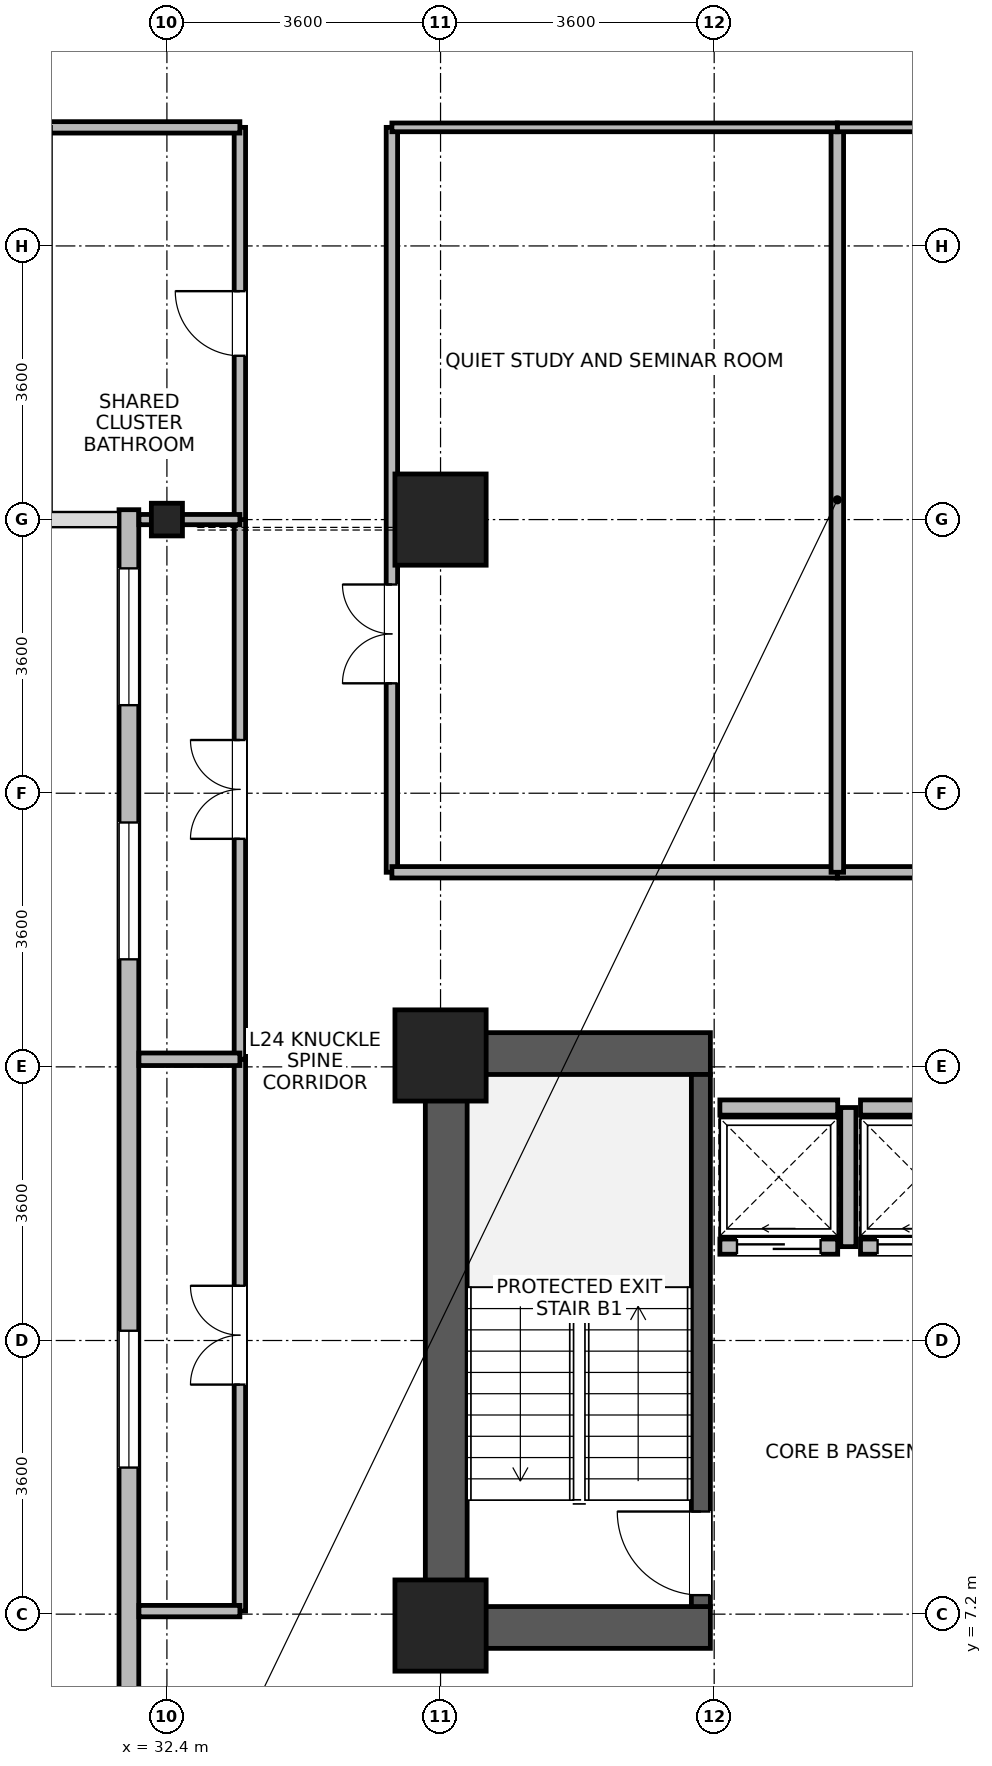
"""IFC4 building model, lengths in metres.
Left out: names, types, materials, properties, quantities, classifications, styles, units other than length and angle.
Written with IfcOpenShell. Run it as: python <this file> out.ifc"""

import sys

from ifc_helpers import new_model, si_unit, direction, frame, frame_2d, origin, origin_2d, place, context, subcontext, project, spatial, rectangle, i_section, extrude, source, transform, mapped, element, fill, save


model = new_model("IFC4")
c1 = context("Model", 3, precision=1e-05, world=origin(), true_north=direction((0.0, 1.0)))
c2 = subcontext(c1, "Body", "Model", "MODEL_VIEW")
j1 = project(units=[si_unit("LENGTHUNIT", "METRE"), si_unit("PLANEANGLEUNIT", "RADIAN")], contexts=[c1])
p1 = place(None, origin())
s1 = spatial("IfcSite", under=j1, at=p1, CompositionType="ELEMENT")
p2 = place(p1, origin())
s2 = spatial("IfcBuilding", under=s1, at=p2, CompositionType="ELEMENT")
p3 = place(p2, frame((0.0, 0.0, 97.1)))
s3 = spatial("IfcBuildingStorey", under=s2, at=p3, CompositionType="ELEMENT", Elevation=97.1)
p4 = place(p3, frame((36.075, 6.75, 0.0), z_axis=(0.0, 0.0, 1.0), x_axis=(0.0, 1.0, 0.0)))
e1 = element("IfcWall", 1, at=p4, inside=s3, PredefinedType="SHEAR", context=c2, shape_type="SweptSolid", body=[
    extrude(rectangle(XDim=8.1, YDim=0.55, at=frame_2d((4.05, 0.0))), origin(), (0.0, 0.0, 1.0), 3.45),
])
for number, where, z_axis, x_axis in (
    (2, (36.35, 7.025, 0.0), (0.0, 0.0, 1.0), (1.0, 0.0, 0.0)),
    (3, (36.35, 14.575, 0.0), (0.0, 0.0, 1.0), (1.0, 0.0, 0.0)),
):
    element("IfcWall", number, at=place(p3, frame(where, z_axis=z_axis, x_axis=x_axis)), inside=s3, PredefinedType="SHEAR", context=c2, shape_type="SweptSolid", body=[
        extrude(rectangle(XDim=3.2, YDim=0.55, at=frame_2d((1.6, 0.0))), origin(), (0.0, 0.0, 1.0), 3.45),
    ])
p5 = place(p3, frame((39.425, 7.3, 0.0), z_axis=(0.0, 0.0, 1.0), x_axis=(0.0, 1.0, 0.0)))
e4 = element("IfcWall", 4, at=p5, inside=s3, PredefinedType="SHEAR", context=c2, shape_type="SweptSolid", body=[
    extrude(rectangle(XDim=7.0, YDim=0.25, at=frame_2d((3.5, 0.0))), origin(), (0.0, 0.0, 1.0), 3.45),
])
p6 = place(p5, frame((0.15, 0.0, 0.0)))
e5 = element("IfcOpeningElement", 5, at=p6, cuts=e4, PredefinedType="OPENING", context=c2, shape_type="SweptSolid", body=[
    extrude(rectangle(XDim=1.1, YDim=2.08, at=frame_2d((0.55, 1.04))), frame((0.0, 0.135, 0.0), z_axis=(0.0, -1.0, 0.0), x_axis=(1.0, 0.0, 0.0)), (0.0, 0.0, 1.0), 0.27),
])
m1 = source(origin(), c2, "Body", "SweptSolid", [
    extrude(rectangle(XDim=1.2, YDim=1.2, at=origin_2d()), origin(), (0.0, 0.0, 1.0), 3.7),
])
for number, where, z_axis, x_axis in (
    (6, (36.0, 21.6, 0.0), (0.0, 0.0, 1.0), (1.0, 0.0, 0.0)),
    (7, (36.0, 7.05, 0.0), (0.0, 0.0, 1.0), (1.0, 0.0, 0.0)),
    (8, (36.0, 14.55, 0.0), (0.0, 0.0, 1.0), (1.0, 0.0, 0.0)),
):
    element("IfcColumn", number, at=place(p3, frame(where, z_axis=z_axis, x_axis=x_axis)), inside=s3, PredefinedType="COLUMN", context=c2, shape_type="MappedRepresentation", body=[
        mapped(m1, transform((0.0, 0.0, 0.0), x_axis=(1.0, 0.0, 0.0), y_axis=(0.0, 1.0, 0.0), z_axis=(0.0, 0.0, 1.0), scale=1.0)),
    ])
m2 = source(origin(), c2, "Body", "SweptSolid", [
    extrude(i_section(OverallWidth=0.409, OverallDepth=0.43, WebThickness=0.024, FlangeThickness=0.033, FilletRadius=0.015, at=origin_2d()), origin(), (0.0, 0.0, 1.0), 3.7),
])
p7 = place(p3, frame((32.4, 21.6, 0.0), z_axis=(0.0, 0.0, 1.0), x_axis=(1.0, 0.0, 0.0)))
e9 = element("IfcColumn", 9, at=p7, inside=s3, PredefinedType="COLUMN", context=c2, shape_type="MappedRepresentation", body=[
    mapped(m2, transform((0.0, 0.0, 0.0), x_axis=(1.0, 0.0, 0.0), y_axis=(0.0, 1.0, 0.0), z_axis=(0.0, 0.0, 1.0), scale=1.0)),
])
p8 = place(p3, frame((31.9, 1.67, 0.0), z_axis=(0.0, 0.0, 1.0), x_axis=(0.0, 1.0, 0.0)))
e10 = element("IfcWall", 10, at=p8, inside=s3, PredefinedType="STANDARD", context=c2, shape_type="SweptSolid", body=[
    extrude(rectangle(XDim=20.06, YDim=0.26, at=frame_2d((10.03, 0.0))), origin(), (0.0, 0.0, 1.0), 3.43),
])
p9 = place(p8, frame((0.772, 0.0, 0.85)))
e11 = element("IfcOpeningElement", 11, at=p9, cuts=e10, PredefinedType="OPENING", context=c2, shape_type="SweptSolid", body=[
    extrude(rectangle(XDim=1.8, YDim=1.85, at=frame_2d((0.9, 0.925))), frame((0.0, 0.14, 0.0), z_axis=(0.0, -1.0, 0.0), x_axis=(1.0, 0.0, 0.0)), (0.0, 0.0, 1.0), 0.28),
])
p10 = place(p8, frame((7.458, 0.0, 0.85)))
e12 = element("IfcOpeningElement", 12, at=p10, cuts=e10, PredefinedType="OPENING", context=c2, shape_type="SweptSolid", body=[
    extrude(rectangle(XDim=1.8, YDim=1.85, at=frame_2d((0.9, 0.925))), frame((0.0, 0.14, 0.0), z_axis=(0.0, -1.0, 0.0), x_axis=(1.0, 0.0, 0.0)), (0.0, 0.0, 1.0), 0.28),
])
p11 = place(p8, frame((14.145, 0.0, 0.85)))
e13 = element("IfcOpeningElement", 13, at=p11, cuts=e10, PredefinedType="OPENING", context=c2, shape_type="SweptSolid", body=[
    extrude(rectangle(XDim=1.8, YDim=1.85, at=frame_2d((0.9, 0.925))), frame((0.0, 0.14, 0.0), z_axis=(0.0, -1.0, 0.0), x_axis=(1.0, 0.0, 0.0)), (0.0, 0.0, 1.0), 0.28),
])
p12 = place(p8, frame((17.488, 0.0, 0.85)))
e14 = element("IfcOpeningElement", 14, at=p12, cuts=e10, PredefinedType="OPENING", context=c2, shape_type="SweptSolid", body=[
    extrude(rectangle(XDim=1.8, YDim=1.85, at=frame_2d((0.9, 0.925))), frame((0.0, 0.14, 0.0), z_axis=(0.0, -1.0, 0.0), x_axis=(1.0, 0.0, 0.0)), (0.0, 0.0, 1.0), 0.28),
])
p13 = place(p3, frame((39.675, 12.035, 0.0), z_axis=(0.0, 0.0, 1.0), x_axis=(1.0, 0.0, 0.0)))
e15 = element("IfcWall", 15, at=p13, inside=s3, PredefinedType="PARTITIONING", context=c2, shape_type="SweptSolid", body=[
    extrude(rectangle(XDim=1.55, YDim=0.2, at=frame_2d((0.775, 0.0))), origin(), (0.0, 0.0, 1.0), 3.43),
])
p14 = place(p13, frame((0.225, 0.0, 0.0)))
e16 = element("IfcOpeningElement", 16, at=p14, cuts=e15, PredefinedType="OPENING", context=c2, shape_type="SweptSolid", body=[
    extrude(rectangle(XDim=1.1, YDim=2.12, at=frame_2d((0.55, 1.06))), frame((0.0, 0.11, 0.0), z_axis=(0.0, -1.0, 0.0), x_axis=(1.0, 0.0, 0.0)), (0.0, 0.0, 1.0), 0.22),
])
p15 = place(p3, frame((39.675, 13.865, 0.0), z_axis=(0.0, 0.0, 1.0), x_axis=(1.0, 0.0, 0.0)))
e17 = element("IfcWall", 17, at=p15, inside=s3, PredefinedType="PARTITIONING", context=c2, shape_type="SweptSolid", body=[
    extrude(rectangle(XDim=1.55, YDim=0.2, at=frame_2d((0.775, 0.0))), origin(), (0.0, 0.0, 1.0), 3.43),
])
p16 = place(p3, frame((41.365, 12.035, 0.0), z_axis=(0.0, 0.0, 1.0), x_axis=(0.0, 1.0, 0.0)))
e18 = element("IfcWall", 18, at=p16, inside=s3, PredefinedType="PARTITIONING", context=c2, shape_type="SweptSolid", body=[
    extrude(rectangle(XDim=1.83, YDim=0.2, at=frame_2d((0.915, 0.0))), origin(), (0.0, 0.0, 1.0), 3.43),
])
p17 = place(p3, frame((41.525, 12.035, 0.0), z_axis=(0.0, 0.0, 1.0), x_axis=(1.0, 0.0, 0.0)))
e19 = element("IfcWall", 19, at=p17, inside=s3, PredefinedType="PARTITIONING", context=c2, shape_type="SweptSolid", body=[
    extrude(rectangle(XDim=1.55, YDim=0.2, at=frame_2d((0.775, 0.0))), origin(), (0.0, 0.0, 1.0), 3.43),
])
p18 = place(p17, frame((0.225, 0.0, 0.0)))
e20 = element("IfcOpeningElement", 20, at=p18, cuts=e19, PredefinedType="OPENING", context=c2, shape_type="SweptSolid", body=[
    extrude(rectangle(XDim=1.1, YDim=2.12, at=frame_2d((0.55, 1.06))), frame((0.0, 0.11, 0.0), z_axis=(0.0, -1.0, 0.0), x_axis=(1.0, 0.0, 0.0)), (0.0, 0.0, 1.0), 0.22),
])
p19 = place(p3, frame((41.525, 13.865, 0.0), z_axis=(0.0, 0.0, 1.0), x_axis=(1.0, 0.0, 0.0)))
e21 = element("IfcWall", 21, at=p19, inside=s3, PredefinedType="PARTITIONING", context=c2, shape_type="SweptSolid", body=[
    extrude(rectangle(XDim=1.55, YDim=0.2, at=frame_2d((0.775, 0.0))), origin(), (0.0, 0.0, 1.0), 3.43),
])
p20 = place(p3, frame((35.36, 16.96, 0.0), z_axis=(0.0, 0.0, 1.0), x_axis=(0.0, 1.0, 0.0)))
e22 = element("IfcWall", 22, at=p20, inside=s3, PredefinedType="PARTITIONING", context=c2, shape_type="SweptSolid", body=[
    extrude(rectangle(XDim=9.8, YDim=0.15, at=frame_2d((4.9, 0.0))), origin(), (0.0, 0.0, 1.0), 3.43),
])
p21 = place(p20, frame((2.486, 0.0, 0.0)))
e23 = element("IfcOpeningElement", 23, at=p21, cuts=e22, PredefinedType="OPENING", context=c2, shape_type="SweptSolid", body=[
    extrude(rectangle(XDim=1.3, YDim=2.12, at=frame_2d((0.65, 1.06))), frame((0.0, 0.085, 0.0), z_axis=(0.0, -1.0, 0.0), x_axis=(1.0, 0.0, 0.0)), (0.0, 0.0, 1.0), 0.17),
])
p22 = place(p3, frame((33.36, 7.24, 0.0), z_axis=(0.0, 0.0, 1.0), x_axis=(0.0, 1.0, 0.0)))
e24 = element("IfcWall", 24, at=p22, inside=s3, PredefinedType="PARTITIONING", context=c2, shape_type="SweptSolid", body=[
    extrude(rectangle(XDim=7.26, YDim=0.15, at=frame_2d((3.63, 0.0))), origin(), (0.0, 0.0, 1.0), 3.43),
])
p23 = place(p22, frame((2.98, 0.0, 0.0)))
e25 = element("IfcOpeningElement", 25, at=p23, cuts=e24, PredefinedType="OPENING", context=c2, shape_type="SweptSolid", body=[
    extrude(rectangle(XDim=1.3, YDim=2.12, at=frame_2d((0.65, 1.06))), frame((0.0, 0.085, 0.0), z_axis=(0.0, -1.0, 0.0), x_axis=(1.0, 0.0, 0.0)), (0.0, 0.0, 1.0), 0.17),
])
p24 = place(p3, frame((33.36, 14.5, 0.0), z_axis=(0.0, 0.0, 1.0), x_axis=(0.0, 1.0, 0.0)))
e26 = element("IfcWall", 26, at=p24, inside=s3, PredefinedType="PARTITIONING", context=c2, shape_type="SweptSolid", body=[
    extrude(rectangle(XDim=7.1, YDim=0.15, at=frame_2d((3.55, 0.0))), origin(), (0.0, 0.0, 1.0), 3.43),
])
p25 = place(p24, frame((2.9, 0.0, 0.0)))
e27 = element("IfcOpeningElement", 27, at=p25, cuts=e26, PredefinedType="OPENING", context=c2, shape_type="SweptSolid", body=[
    extrude(rectangle(XDim=1.3, YDim=2.12, at=frame_2d((0.65, 1.06))), frame((0.0, 0.085, 0.0), z_axis=(0.0, -1.0, 0.0), x_axis=(1.0, 0.0, 0.0)), (0.0, 0.0, 1.0), 0.17),
])
p26 = place(p3, frame((41.22, 16.96, 0.0), z_axis=(0.0, 0.0, 1.0), x_axis=(1.0, 0.0, 0.0)))
e28 = element("IfcWall", 28, at=p26, inside=s3, PredefinedType="PARTITIONING", context=c2, shape_type="SweptSolid", body=[
    extrude(rectangle(XDim=6.46, YDim=0.15, at=frame_2d((3.23, 0.0))), origin(), (0.0, 0.0, 1.0), 3.43),
])
p27 = place(p26, frame((2.58, 0.0, 0.0)))
e29 = element("IfcOpeningElement", 29, at=p27, cuts=e28, PredefinedType="OPENING", context=c2, shape_type="SweptSolid", body=[
    extrude(rectangle(XDim=1.3, YDim=2.12, at=frame_2d((0.65, 1.06))), frame((0.0, 0.085, 0.0), z_axis=(0.0, -1.0, 0.0), x_axis=(1.0, 0.0, 0.0)), (0.0, 0.0, 1.0), 0.17),
])
p28 = place(p3, frame((35.36, 16.96, 0.0), z_axis=(0.0, 0.0, 1.0), x_axis=(1.0, 0.0, 0.0)))
e30 = element("IfcWall", 30, at=p28, inside=s3, PredefinedType="PARTITIONING", context=c2, shape_type="SweptSolid", body=[
    extrude(rectangle(XDim=5.86, YDim=0.15, at=frame_2d((2.93, 0.0))), origin(), (0.0, 0.0, 1.0), 3.43),
])
p29 = place(p3, frame((33.36, 21.6, 0.0), z_axis=(0.0, 0.0, 1.0), x_axis=(0.0, 1.0, 0.0)))
e31 = element("IfcWall", 31, at=p29, inside=s3, PredefinedType="PARTITIONING", context=c2, shape_type="SweptSolid", body=[
    extrude(rectangle(XDim=5.16, YDim=0.15, at=frame_2d((2.58, 0.0))), origin(), (0.0, 0.0, 1.0), 3.43),
])
p30 = place(p29, frame((2.155, 0.0, 0.0)))
e32 = element("IfcOpeningElement", 32, at=p30, cuts=e31, PredefinedType="OPENING", context=c2, shape_type="SweptSolid", body=[
    extrude(rectangle(XDim=0.85, YDim=2.04, at=frame_2d((0.425, 1.02))), frame((0.0, 0.085, 0.0), z_axis=(0.0, -1.0, 0.0), x_axis=(1.0, 0.0, 0.0)), (0.0, 0.0, 1.0), 0.17),
])
p31 = place(p3, frame((30.8, 26.76, 0.0), z_axis=(0.0, 0.0, 1.0), x_axis=(1.0, 0.0, 0.0)))
e33 = element("IfcWall", 33, at=p31, inside=s3, PredefinedType="PARTITIONING", context=c2, shape_type="SweptSolid", body=[
    extrude(rectangle(XDim=2.56, YDim=0.15, at=frame_2d((1.28, 0.0))), origin(), (0.0, 0.0, 1.0), 3.43),
])
p32 = place(p3, frame((32.032, 7.24, 0.0), z_axis=(0.0, 0.0, 1.0), x_axis=(1.0, 0.0, 0.0)))
e34 = element("IfcWall", 34, at=p32, inside=s3, PredefinedType="PARTITIONING", context=c2, shape_type="SweptSolid", body=[
    extrude(rectangle(XDim=1.328, YDim=0.15, at=frame_2d((0.664, 0.0))), origin(), (0.0, 0.0, 1.0), 3.43),
])
p33 = place(p3, frame((41.22, 16.96, 0.0), z_axis=(0.0, 0.0, 1.0), x_axis=(0.0, 1.0, 0.0)))
e35 = element("IfcWall", 35, at=p33, inside=s3, PredefinedType="PARTITIONING", context=c2, shape_type="SweptSolid", body=[
    extrude(rectangle(XDim=9.8, YDim=0.165, at=frame_2d((4.9, 0.0))), origin(), (0.0, 0.0, 1.0), 3.43),
])
p34 = place(p3, frame((41.22, 26.76, 0.0), z_axis=(0.0, 0.0, 1.0), x_axis=(1.0, 0.0, 0.0)))
e36 = element("IfcWall", 36, at=p34, inside=s3, PredefinedType="PARTITIONING", context=c2, shape_type="SweptSolid", body=[
    extrude(rectangle(XDim=6.46, YDim=0.115, at=frame_2d((3.23, 0.0))), origin(), (0.0, 0.0, 1.0), 3.43),
])
p35 = place(p3, frame((35.36, 26.76, 0.0), z_axis=(0.0, 0.0, 1.0), x_axis=(1.0, 0.0, 0.0)))
e37 = element("IfcWall", 37, at=p35, inside=s3, PredefinedType="PARTITIONING", context=c2, shape_type="SweptSolid", body=[
    extrude(rectangle(XDim=5.86, YDim=0.115, at=frame_2d((2.93, 0.0))), origin(), (0.0, 0.0, 1.0), 3.43),
])
p36 = place(p3, frame((32.032, 14.5, 0.0), z_axis=(0.0, 0.0, 1.0), x_axis=(1.0, 0.0, 0.0)))
e38 = element("IfcWall", 38, at=p36, inside=s3, PredefinedType="PARTITIONING", context=c2, shape_type="SweptSolid", body=[
    extrude(rectangle(XDim=1.328, YDim=0.165, at=frame_2d((0.664, 0.0))), origin(), (0.0, 0.0, 1.0), 3.43),
])
p37 = place(p3, frame((32.032, 21.6, 0.0), z_axis=(0.0, 0.0, 1.0), x_axis=(1.0, 0.0, 0.0)))
e39 = element("IfcWall", 39, at=p37, inside=s3, PredefinedType="PARTITIONING", context=c2, shape_type="SweptSolid", body=[
    extrude(rectangle(XDim=1.328, YDim=0.135, at=frame_2d((0.664, 0.0))), origin(), (0.0, 0.0, 1.0), 2.98),
])
p38 = place(p10, origin())
e40 = element("IfcWindow", 40, at=p38, inside=s3, PartitioningType="SINGLE_PANEL", PredefinedType="WINDOW", context=c2, shape_type="SweptSolid", body=[
    extrude(rectangle(XDim=1.8, YDim=1.85, at=frame_2d((0.9, 0.925))), frame((0.0, 0.03, 0.0), z_axis=(0.0, -1.0, 0.0), x_axis=(1.0, 0.0, 0.0)), (0.0, 0.0, 1.0), 0.06),
])
fill(e12, e40)
p39 = place(p11, origin())
e41 = element("IfcWindow", 41, at=p39, inside=s3, PartitioningType="SINGLE_PANEL", PredefinedType="WINDOW", context=c2, shape_type="SweptSolid", body=[
    extrude(rectangle(XDim=1.8, YDim=1.85, at=frame_2d((0.9, 0.925))), frame((0.0, 0.03, 0.0), z_axis=(0.0, -1.0, 0.0), x_axis=(1.0, 0.0, 0.0)), (0.0, 0.0, 1.0), 0.06),
])
fill(e13, e41)
p40 = place(p12, origin())
e42 = element("IfcWindow", 42, at=p40, inside=s3, PartitioningType="SINGLE_PANEL", PredefinedType="WINDOW", context=c2, shape_type="SweptSolid", body=[
    extrude(rectangle(XDim=1.8, YDim=1.85, at=frame_2d((0.9, 0.925))), frame((0.0, 0.03, 0.0), z_axis=(0.0, -1.0, 0.0), x_axis=(1.0, 0.0, 0.0)), (0.0, 0.0, 1.0), 0.06),
])
fill(e14, e42)
p41 = place(p6, origin())
e43 = element("IfcDoor", 43, at=p41, inside=s3, OperationType="SINGLE_SWING_RIGHT", PredefinedType="DOOR", context=c2, shape_type="SweptSolid", body=[
    extrude(rectangle(XDim=1.1, YDim=2.08, at=frame_2d((0.55, 1.04))), frame((0.0, 0.025, 0.0), z_axis=(0.0, -1.0, 0.0), x_axis=(1.0, 0.0, 0.0)), (0.0, 0.0, 1.0), 0.05),
])
fill(e5, e43)
p42 = place(p14, origin())
e44 = element("IfcDoor", 44, at=p42, inside=s3, OperationType="SLIDING_TO_LEFT", PredefinedType="DOOR", context=c2, shape_type="SweptSolid", body=[
    extrude(rectangle(XDim=1.1, YDim=2.12, at=frame_2d((0.55, 1.06))), frame((0.0, 0.025, 0.0), z_axis=(0.0, -1.0, 0.0), x_axis=(1.0, 0.0, 0.0)), (0.0, 0.0, 1.0), 0.05),
])
fill(e16, e44)
p43 = place(p18, origin())
e45 = element("IfcDoor", 45, at=p43, inside=s3, OperationType="SLIDING_TO_LEFT", PredefinedType="DOOR", context=c2, shape_type="SweptSolid", body=[
    extrude(rectangle(XDim=1.1, YDim=2.12, at=frame_2d((0.55, 1.06))), frame((0.0, 0.025, 0.0), z_axis=(0.0, -1.0, 0.0), x_axis=(1.0, 0.0, 0.0)), (0.0, 0.0, 1.0), 0.05),
])
fill(e20, e45)
p44 = place(p21, origin())
e46 = element("IfcDoor", 46, at=p44, inside=s3, OperationType="DOUBLE_DOOR_SINGLE_SWING", PredefinedType="DOOR", context=c2, shape_type="SweptSolid", body=[
    extrude(rectangle(XDim=1.3, YDim=2.12, at=frame_2d((0.65, 1.06))), frame((0.0, 0.025, 0.0), z_axis=(0.0, -1.0, 0.0), x_axis=(1.0, 0.0, 0.0)), (0.0, 0.0, 1.0), 0.05),
])
fill(e23, e46)
p45 = place(p23, origin())
e47 = element("IfcDoor", 47, at=p45, inside=s3, OperationType="DOUBLE_DOOR_SINGLE_SWING", PredefinedType="DOOR", context=c2, shape_type="SweptSolid", body=[
    extrude(rectangle(XDim=1.3, YDim=2.12, at=frame_2d((0.65, 1.06))), frame((0.0, 0.025, 0.0), z_axis=(0.0, -1.0, 0.0), x_axis=(1.0, 0.0, 0.0)), (0.0, 0.0, 1.0), 0.05),
])
fill(e25, e47)
p46 = place(p25, origin())
e48 = element("IfcDoor", 48, at=p46, inside=s3, OperationType="DOUBLE_DOOR_SINGLE_SWING", PredefinedType="DOOR", context=c2, shape_type="SweptSolid", body=[
    extrude(rectangle(XDim=1.3, YDim=2.12, at=frame_2d((0.65, 1.06))), frame((0.0, 0.025, 0.0), z_axis=(0.0, -1.0, 0.0), x_axis=(1.0, 0.0, 0.0)), (0.0, 0.0, 1.0), 0.05),
])
fill(e27, e48)
p47 = place(p30, origin())
e49 = element("IfcDoor", 49, at=p47, inside=s3, OperationType="SINGLE_SWING_RIGHT", PredefinedType="DOOR", context=c2, shape_type="SweptSolid", body=[
    extrude(rectangle(XDim=0.85, YDim=2.04, at=frame_2d((0.425, 1.02))), frame((0.0, 0.025, 0.0), z_axis=(0.0, -1.0, 0.0), x_axis=(1.0, 0.0, 0.0)), (0.0, 0.0, 1.0), 0.05),
])
fill(e32, e49)
save(model, sys.argv[1])
